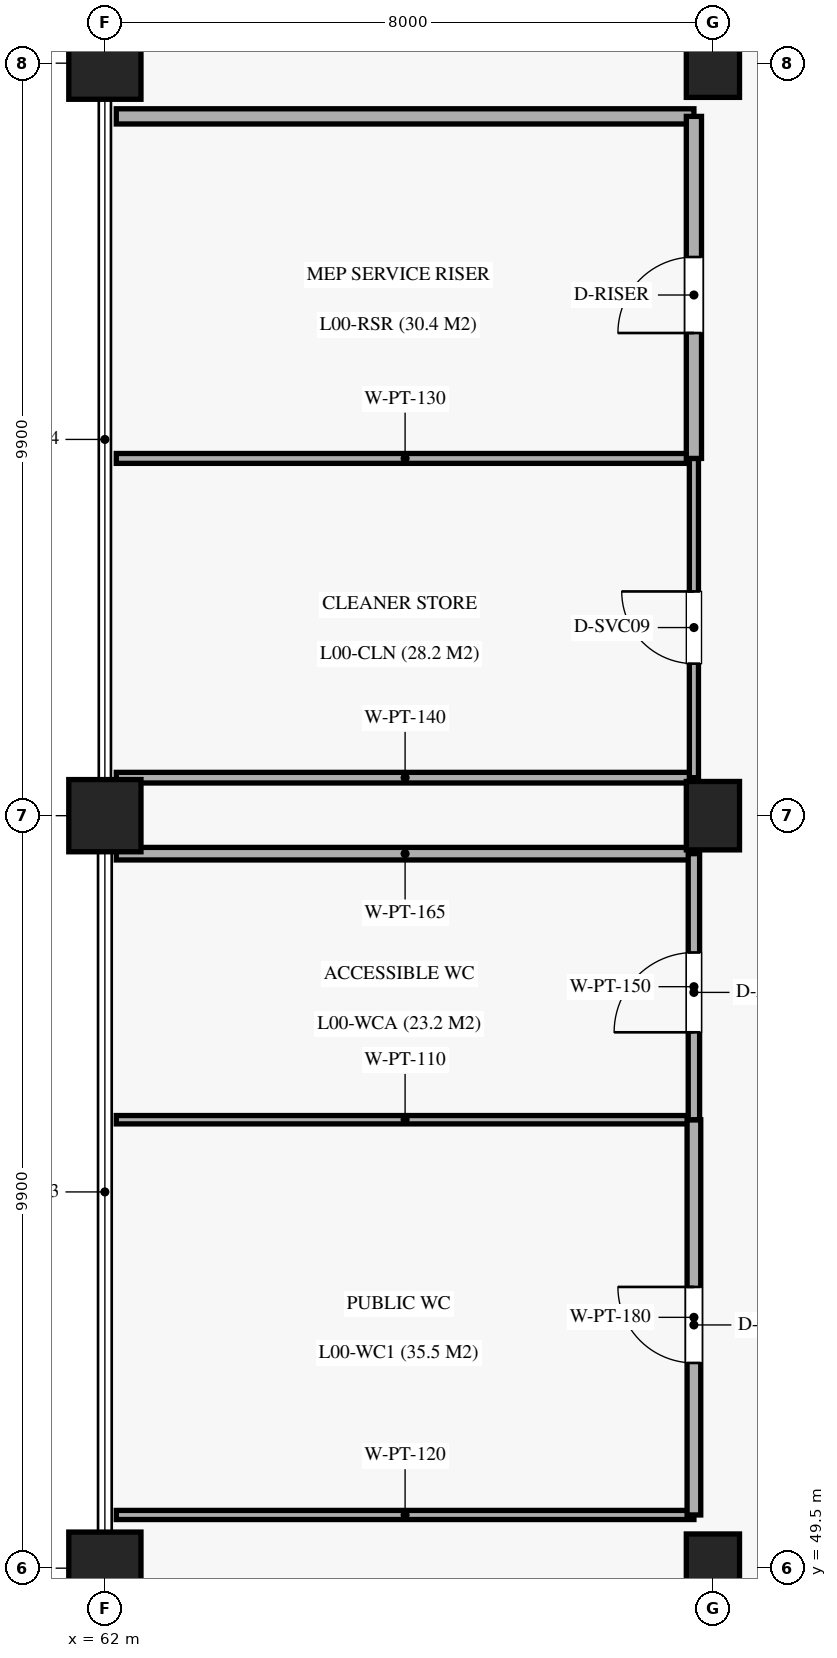
"""IFC4 building model, lengths in metres.
Left out: names, types, materials, properties, quantities, classifications, styles, units other than length and angle.
Written with IfcOpenShell. Run it as: python <this file> out.ifc"""

import sys

from ifc_helpers import new_model, si_unit, direction, frame, frame_2d, origin, origin_2d, place, context, subcontext, project, spatial, rectangle, extrude, element, fill, save


model = new_model("IFC4")
c1 = context("Model", 3, precision=1e-05, world=origin(), true_north=direction((0.0, 1.0)))
c2 = subcontext(c1, "Body", "Model", "MODEL_VIEW")
j1 = project(units=[si_unit("LENGTHUNIT", "METRE"), si_unit("PLANEANGLEUNIT", "RADIAN")], contexts=[c1])
p1 = place(None, origin())
s1 = spatial("IfcSite", under=j1, at=p1, CompositionType="ELEMENT")
p2 = place(p1, origin())
s2 = spatial("IfcBuilding", under=s1, at=p2, CompositionType="ELEMENT")
p3 = place(p2, origin())
s3 = spatial("IfcBuildingStorey", under=s2, at=p3, CompositionType="ELEMENT", Elevation=0.0)
for number, where, z_axis, x_axis in (
    (1, (62.0, 49.5, 0.0), (0.0, 0.0, 1.0), (1.0, 0.0, 0.0)),
    (2, (62.0, 59.4, 0.0), (0.0, 0.0, 1.0), (1.0, 0.0, 0.0)),
    (3, (62.0, 69.3, 0.0), (0.0, 0.0, 1.0), (1.0, 0.0, 0.0)),
):
    element("IfcColumn", number, at=place(p3, frame(where, z_axis=z_axis, x_axis=x_axis)), inside=s3, PredefinedType="COLUMN", context=c2, shape_type="SweptSolid", body=[
        extrude(rectangle(XDim=0.95, YDim=0.95, at=origin_2d()), origin(), (0.0, 0.0, 1.0), 5.44),
    ])
for number, where, z_axis, x_axis in (
    (4, (70.0, 49.5, 0.0), (0.0, 0.0, 1.0), (1.0, 0.0, 0.0)),
    (5, (70.0, 59.4, 0.0), (0.0, 0.0, 1.0), (1.0, 0.0, 0.0)),
    (6, (70.0, 69.3, 0.0), (0.0, 0.0, 1.0), (1.0, 0.0, 0.0)),
):
    element("IfcColumn", number, at=place(p3, frame(where, z_axis=z_axis, x_axis=x_axis)), inside=s3, PredefinedType="COLUMN", context=c2, shape_type="SweptSolid", body=[
        extrude(rectangle(XDim=0.7, YDim=0.9, at=origin_2d()), origin(), (0.0, 0.0, 1.0), 5.44),
    ])
p4 = place(p3, frame((62.15, 50.2, 0.0), z_axis=(0.0, 0.0, 1.0), x_axis=(1.0, 0.0, 0.0)))
e7 = element("IfcWall", 7, at=p4, inside=s3, PredefinedType="PARTITIONING", context=c2, shape_type="SweptSolid", body=[
    extrude(rectangle(XDim=7.6, YDim=0.12, at=frame_2d((3.8, 0.0))), origin(), (0.0, 0.0, 1.0), 4.3),
])
p5 = place(p3, frame((62.15, 55.4, 0.0), z_axis=(0.0, 0.0, 1.0), x_axis=(1.0, 0.0, 0.0)))
e8 = element("IfcWall", 8, at=p5, inside=s3, PredefinedType="PARTITIONING", context=c2, shape_type="SweptSolid", body=[
    extrude(rectangle(XDim=7.6, YDim=0.11, at=frame_2d((3.8, 0.0))), origin(), (0.0, 0.0, 1.0), 4.3),
])
p6 = place(p3, frame((69.75, 50.2, 0.0), z_axis=(0.0, 0.0, 1.0), x_axis=(0.0, 1.0, 0.0)))
e9 = element("IfcWall", 9, at=p6, inside=s3, PredefinedType="PARTITIONING", context=c2, shape_type="SweptSolid", body=[
    extrude(rectangle(XDim=5.2, YDim=0.18, at=frame_2d((2.6, 0.0))), origin(), (0.0, 0.0, 1.0), 4.3),
])
p7 = place(p6, frame((2.0, 0.0, 0.0)))
e10 = element("IfcOpeningElement", 10, at=p7, cuts=e9, PredefinedType="OPENING", context=c2, shape_type="SweptSolid", body=[
    extrude(rectangle(XDim=1.0, YDim=2.1, at=frame_2d((0.5, 1.05))), frame((0.0, 0.1, 0.0), z_axis=(0.0, -1.0, 0.0), x_axis=(1.0, 0.0, 0.0)), (0.0, 0.0, 1.0), 0.2),
])
p8 = place(p3, frame((62.15, 58.9, 0.0), z_axis=(0.0, 0.0, 1.0), x_axis=(1.0, 0.0, 0.0)))
e11 = element("IfcWall", 11, at=p8, inside=s3, PredefinedType="PARTITIONING", context=c2, shape_type="SweptSolid", body=[
    extrude(rectangle(XDim=7.6, YDim=0.165, at=frame_2d((3.8, 0.0))), origin(), (0.0, 0.0, 1.0), 4.3),
])
p9 = place(p3, frame((69.75, 55.4, 0.0), z_axis=(0.0, 0.0, 1.0), x_axis=(0.0, 1.0, 0.0)))
e12 = element("IfcWall", 12, at=p9, inside=s3, PredefinedType="PARTITIONING", context=c2, shape_type="SweptSolid", body=[
    extrude(rectangle(XDim=3.5, YDim=0.15, at=frame_2d((1.75, 0.0))), origin(), (0.0, 0.0, 1.0), 4.3),
])
p10 = place(p9, frame((1.15, 0.0, 0.0)))
e13 = element("IfcOpeningElement", 13, at=p10, cuts=e12, PredefinedType="OPENING", context=c2, shape_type="SweptSolid", body=[
    extrude(rectangle(XDim=1.05, YDim=2.15, at=frame_2d((0.525, 1.075))), frame((0.0, 0.085, 0.0), z_axis=(0.0, -1.0, 0.0), x_axis=(1.0, 0.0, 0.0)), (0.0, 0.0, 1.0), 0.17),
])
p11 = place(p3, frame((62.15, 59.9, 0.0), z_axis=(0.0, 0.0, 1.0), x_axis=(1.0, 0.0, 0.0)))
e14 = element("IfcWall", 14, at=p11, inside=s3, PredefinedType="PARTITIONING", context=c2, shape_type="SweptSolid", body=[
    extrude(rectangle(XDim=7.6, YDim=0.14, at=frame_2d((3.8, 0.0))), origin(), (0.0, 0.0, 1.0), 4.3),
])
p12 = place(p3, frame((62.15, 64.1, 0.0), z_axis=(0.0, 0.0, 1.0), x_axis=(1.0, 0.0, 0.0)))
e15 = element("IfcWall", 15, at=p12, inside=s3, PredefinedType="PARTITIONING", context=c2, shape_type="SweptSolid", body=[
    extrude(rectangle(XDim=7.6, YDim=0.13, at=frame_2d((3.8, 0.0))), origin(), (0.0, 0.0, 1.0), 4.3),
])
p13 = place(p3, frame((69.75, 59.9, 0.0), z_axis=(0.0, 0.0, 1.0), x_axis=(0.0, 1.0, 0.0)))
e16 = element("IfcWall", 16, at=p13, inside=s3, PredefinedType="PARTITIONING", context=c2, shape_type="SweptSolid", body=[
    extrude(rectangle(XDim=4.2, YDim=0.12, at=frame_2d((2.1, 0.0))), origin(), (0.0, 0.0, 1.0), 4.3),
])
p14 = place(p13, frame((1.5, 0.0, 0.0)))
e17 = element("IfcOpeningElement", 17, at=p14, cuts=e16, PredefinedType="OPENING", context=c2, shape_type="SweptSolid", body=[
    extrude(rectangle(XDim=0.95, YDim=2.1, at=frame_2d((0.475, 1.05))), frame((0.0, 0.07, 0.0), z_axis=(0.0, -1.0, 0.0), x_axis=(1.0, 0.0, 0.0)), (0.0, 0.0, 1.0), 0.14),
])
p15 = place(p3, frame((62.15, 68.6, 0.0), z_axis=(0.0, 0.0, 1.0), x_axis=(1.0, 0.0, 0.0)))
e18 = element("IfcWall", 18, at=p15, inside=s3, PredefinedType="SOLIDWALL", context=c2, shape_type="SweptSolid", body=[
    extrude(rectangle(XDim=7.6, YDim=0.2, at=frame_2d((3.8, 0.0))), origin(), (0.0, 0.0, 1.0), 4.3),
])
p16 = place(p3, frame((69.75, 64.1, 0.0), z_axis=(0.0, 0.0, 1.0), x_axis=(0.0, 1.0, 0.0)))
e19 = element("IfcWall", 19, at=p16, inside=s3, PredefinedType="SOLIDWALL", context=c2, shape_type="SweptSolid", body=[
    extrude(rectangle(XDim=4.5, YDim=0.2, at=frame_2d((2.25, 0.0))), origin(), (0.0, 0.0, 1.0), 4.3),
])
p17 = place(p16, frame((1.65, 0.0, 0.0)))
e20 = element("IfcOpeningElement", 20, at=p17, cuts=e19, PredefinedType="OPENING", context=c2, shape_type="SweptSolid", body=[
    extrude(rectangle(XDim=1.0, YDim=2.15, at=frame_2d((0.5, 1.075))), frame((0.0, 0.11, 0.0), z_axis=(0.0, -1.0, 0.0), x_axis=(1.0, 0.0, 0.0)), (0.0, 0.0, 1.0), 0.22),
])
p18 = place(p7, origin())
e21 = element("IfcDoor", 21, at=p18, inside=s3, OperationType="SINGLE_SWING_RIGHT", PredefinedType="DOOR", context=c2, shape_type="SweptSolid", body=[
    extrude(rectangle(XDim=1.0, YDim=2.1, at=frame_2d((0.5, 1.05))), frame((0.0, 0.025, 0.0), z_axis=(0.0, -1.0, 0.0), x_axis=(1.0, 0.0, 0.0)), (0.0, 0.0, 1.0), 0.05),
])
fill(e10, e21)
p19 = place(p10, origin())
e22 = element("IfcDoor", 22, at=p19, inside=s3, OperationType="SINGLE_SWING_LEFT", PredefinedType="DOOR", context=c2, shape_type="SweptSolid", body=[
    extrude(rectangle(XDim=1.05, YDim=2.15, at=frame_2d((0.525, 1.075))), frame((0.0, 0.025, 0.0), z_axis=(0.0, -1.0, 0.0), x_axis=(1.0, 0.0, 0.0)), (0.0, 0.0, 1.0), 0.05),
])
fill(e13, e22)
p20 = place(p14, origin())
e23 = element("IfcDoor", 23, at=p20, inside=s3, OperationType="SINGLE_SWING_RIGHT", PredefinedType="DOOR", context=c2, shape_type="SweptSolid", body=[
    extrude(rectangle(XDim=0.95, YDim=2.1, at=frame_2d((0.475, 1.05))), frame((0.0, 0.025, 0.0), z_axis=(0.0, -1.0, 0.0), x_axis=(1.0, 0.0, 0.0)), (0.0, 0.0, 1.0), 0.05),
])
fill(e17, e23)
p21 = place(p17, origin())
e24 = element("IfcDoor", 24, at=p21, inside=s3, OperationType="SINGLE_SWING_LEFT", PredefinedType="DOOR", context=c2, shape_type="SweptSolid", body=[
    extrude(rectangle(XDim=1.0, YDim=2.15, at=frame_2d((0.5, 1.075))), frame((0.0, 0.025, 0.0), z_axis=(0.0, -1.0, 0.0), x_axis=(1.0, 0.0, 0.0)), (0.0, 0.0, 1.0), 0.05),
])
fill(e20, e24)
save(model, sys.argv[1])
